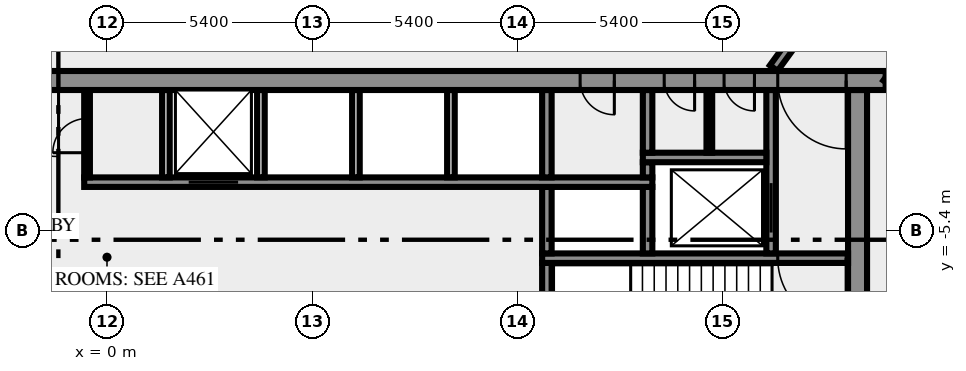
"""IFC4 building model, lengths in metres.
Left out: names, types, materials, properties, quantities, classifications, styles, units other than length and angle.
Written with IfcOpenShell. Run it as: python <this file> out.ifc"""

import sys

from ifc_helpers import new_model, si_unit, direction, frame, frame_2d, origin, place, context, subcontext, project, spatial, rectangle, extrude, element, fill, save


model = new_model("IFC4")
c1 = context("Model", 3, precision=1e-05, world=origin(), true_north=direction((0.0, 1.0)))
c2 = subcontext(c1, "Body", "Model", "MODEL_VIEW")
j1 = project(units=[si_unit("LENGTHUNIT", "METRE"), si_unit("PLANEANGLEUNIT", "RADIAN")], contexts=[c1])
p1 = place(None, origin())
s1 = spatial("IfcSite", under=j1, at=p1, CompositionType="ELEMENT")
p2 = place(p1, origin())
s2 = spatial("IfcBuilding", under=s1, at=p2, CompositionType="ELEMENT")
p3 = place(p2, frame((0.0, 0.0, 71.0)))
s3 = spatial("IfcBuildingStorey", under=s2, at=p3, CompositionType="ELEMENT", Elevation=71.0)
p4 = place(p3, frame((19.75, -10.5, 0.0), z_axis=(0.0, 0.0, 1.0), x_axis=(0.0, 1.0, 0.0)))
e1 = element("IfcWall", 1, at=p4, inside=s3, PredefinedType="SHEAR", context=c2, shape_type="SweptSolid", body=[
    extrude(rectangle(XDim=8.8, YDim=0.5, at=frame_2d((4.4, 0.0))), origin(), (0.0, 0.0, 1.0), 3.65),
])
p5 = place(p3, frame((11.575, -7.25, 0.0), z_axis=(0.0, 0.0, 1.0), x_axis=(0.0, 1.0, 0.0)))
e2 = element("IfcWall", 2, at=p5, inside=s3, PredefinedType="SHEAR", context=c2, shape_type="SweptSolid", body=[
    extrude(rectangle(XDim=1.0, YDim=0.25, at=frame_2d((0.5, 0.0))), origin(), (0.0, 0.0, 1.0), 3.65),
])
p6 = place(p3, frame((19.5, -6.125, 0.0), z_axis=(0.0, 0.0, 1.0), x_axis=(-1.0, 0.0, 0.0)))
e3 = element("IfcWall", 3, at=p6, inside=s3, PredefinedType="SHEAR", context=c2, shape_type="SweptSolid", body=[
    extrude(rectangle(XDim=8.05, YDim=0.25, at=frame_2d((4.025, 0.0))), origin(), (0.0, 0.0, 1.0), 3.65),
])
p7 = place(p6, frame((0.05, 0.0, 0.0)))
e4 = element("IfcOpeningElement", 4, at=p7, cuts=e3, PredefinedType="OPENING", context=c2, shape_type="SweptSolid", body=[
    extrude(rectangle(XDim=1.8, YDim=2.1, at=frame_2d((0.9, 1.05))), frame((0.0, 0.135, 0.0), z_axis=(0.0, -1.0, 0.0), x_axis=(1.0, 0.0, 0.0)), (0.0, 0.0, 1.0), 0.27),
])
for number, where, z_axis, x_axis in (
    (5, (11.575, -6.0, 0.0), (0.0, 0.0, 1.0), (0.0, 1.0, 0.0)),
    (6, (14.225, -6.0, 0.0), (0.0, 0.0, 1.0), (0.0, 1.0, 0.0)),
):
    element("IfcWall", number, at=place(p3, frame(where, z_axis=z_axis, x_axis=x_axis)), inside=s3, PredefinedType="SHEAR", context=c2, shape_type="SweptSolid", body=[
        extrude(rectangle(XDim=1.75, YDim=0.25, at=frame_2d((0.875, 0.0))), origin(), (0.0, 0.0, 1.0), 3.65),
    ])
p8 = place(p3, frame((17.475, -6.0, 0.0), z_axis=(0.0, 0.0, 1.0), x_axis=(0.0, 1.0, 0.0)))
e7 = element("IfcWall", 7, at=p8, inside=s3, PredefinedType="SHEAR", context=c2, shape_type="SweptSolid", body=[
    extrude(rectangle(XDim=4.3, YDim=0.25, at=frame_2d((2.15, 0.0))), origin(), (0.0, 0.0, 1.0), 3.65),
])
p9 = place(p8, frame((0.55, 0.0, 0.0)))
e8 = element("IfcOpeningElement", 8, at=p9, cuts=e7, PredefinedType="OPENING", context=c2, shape_type="SweptSolid", body=[
    extrude(rectangle(XDim=1.3, YDim=2.1, at=frame_2d((0.65, 1.05))), frame((0.0, 0.135, 0.0), z_axis=(0.0, -1.0, 0.0), x_axis=(1.0, 0.0, 0.0)), (0.0, 0.0, 1.0), 0.27),
])
p10 = place(p3, frame((-0.6, -4.125, 0.0), z_axis=(0.0, 0.0, 1.0), x_axis=(1.0, 0.0, 0.0)))
e9 = element("IfcWall", 9, at=p10, inside=s3, PredefinedType="SHEAR", context=c2, shape_type="SweptSolid", body=[
    extrude(rectangle(XDim=14.95, YDim=0.25, at=frame_2d((7.475, 0.0))), origin(), (0.0, 0.0, 1.0), 3.65),
])
p11 = place(p10, frame((2.75, 0.0, 0.0)))
e10 = element("IfcOpeningElement", 10, at=p11, cuts=e9, PredefinedType="OPENING", context=c2, shape_type="SweptSolid", body=[
    extrude(rectangle(XDim=1.3, YDim=2.1, at=frame_2d((0.65, 1.05))), frame((0.0, 0.135, 0.0), z_axis=(0.0, -1.0, 0.0), x_axis=(1.0, 0.0, 0.0)), (0.0, 0.0, 1.0), 0.27),
])
p12 = place(p3, frame((-0.525, -4.0, 0.0), z_axis=(0.0, 0.0, 1.0), x_axis=(0.0, 1.0, 0.0)))
e11 = element("IfcWall", 11, at=p12, inside=s3, PredefinedType="PARTITIONING", context=c2, shape_type="SweptSolid", body=[
    extrude(rectangle(XDim=2.3, YDim=0.15, at=frame_2d((1.15, 0.0))), origin(), (0.0, 0.0, 1.0), 3.65),
])
p13 = place(p12, frame((0.65, 0.0, 0.0)))
e12 = element("IfcOpeningElement", 12, at=p13, cuts=e11, PredefinedType="OPENING", context=c2, shape_type="SweptSolid", body=[
    extrude(rectangle(XDim=0.9, YDim=2.1, at=frame_2d((0.45, 1.05))), frame((0.0, 0.085, 0.0), z_axis=(0.0, -1.0, 0.0), x_axis=(1.0, 0.0, 0.0)), (0.0, 0.0, 1.0), 0.17),
])
for number, where, z_axis, x_axis in (
    (13, (1.55, -4.0, 0.0), (0.0, 0.0, 1.0), (0.0, 1.0, 0.0)),
    (14, (4.05, -4.0, 0.0), (0.0, 0.0, 1.0), (0.0, 1.0, 0.0)),
    (15, (6.55, -4.0, 0.0), (0.0, 0.0, 1.0), (0.0, 1.0, 0.0)),
    (16, (9.05, -4.0, 0.0), (0.0, 0.0, 1.0), (0.0, 1.0, 0.0)),
):
    element("IfcWall", number, at=place(p3, frame(where, z_axis=z_axis, x_axis=x_axis)), inside=s3, PredefinedType="SOLIDWALL", context=c2, shape_type="SweptSolid", body=[
        extrude(rectangle(XDim=2.3, YDim=0.2, at=frame_2d((1.15, 0.0))), origin(), (0.0, 0.0, 1.0), 3.65),
    ])
p14 = place(p3, frame((11.575, -4.0, 0.0), z_axis=(0.0, 0.0, 1.0), x_axis=(0.0, 1.0, 0.0)))
e17 = element("IfcWall", 17, at=p14, inside=s3, PredefinedType="SHEAR", context=c2, shape_type="SweptSolid", body=[
    extrude(rectangle(XDim=2.3, YDim=0.25, at=frame_2d((1.15, 0.0))), origin(), (0.0, 0.0, 1.0), 3.65),
])
p15 = place(p3, frame((14.225, -4.0, 0.0), z_axis=(0.0, 0.0, 1.0), x_axis=(0.0, 1.0, 0.0)))
e18 = element("IfcWall", 18, at=p15, inside=s3, PredefinedType="SHEAR", context=c2, shape_type="SweptSolid", body=[
    extrude(rectangle(XDim=0.4, YDim=0.25, at=frame_2d((0.2, 0.0))), origin(), (0.0, 0.0, 1.0), 3.65),
])
p16 = place(p3, frame((14.1, -3.475, 0.0), z_axis=(0.0, 0.0, 1.0), x_axis=(1.0, 0.0, 0.0)))
e19 = element("IfcWall", 19, at=p16, inside=s3, PredefinedType="SHEAR", context=c2, shape_type="SweptSolid", body=[
    extrude(rectangle(XDim=3.25, YDim=0.25, at=frame_2d((1.625, 0.0))), origin(), (0.0, 0.0, 1.0), 3.65),
])
p17 = place(p3, frame((14.225, -3.35, 0.0), z_axis=(0.0, 0.0, 1.0), x_axis=(0.0, 1.0, 0.0)))
e20 = element("IfcWall", 20, at=p17, inside=s3, PredefinedType="SHEAR", context=c2, shape_type="SweptSolid", body=[
    extrude(rectangle(XDim=1.65, YDim=0.25, at=frame_2d((0.825, 0.0))), origin(), (0.0, 0.0, 1.0), 3.65),
])
p18 = place(p3, frame((15.85, -3.35, 0.0), z_axis=(0.0, 0.0, 1.0), x_axis=(0.0, 1.0, 0.0)))
e21 = element("IfcWall", 21, at=p18, inside=s3, PredefinedType="PARTITIONING", context=c2, shape_type="SweptSolid", body=[
    extrude(rectangle(XDim=1.65, YDim=0.15, at=frame_2d((0.825, 0.0))), origin(), (0.0, 0.0, 1.0), 3.65),
])
p19 = place(p3, frame((20.49, -1.45, 0.0), z_axis=(0.0, 0.0, 1.0), x_axis=(-1.0, 0.0, 0.0)))
e22 = element("IfcWall", 22, at=p19, inside=s3, PredefinedType="SHEAR", context=c2, shape_type="SweptSolid", body=[
    extrude(rectangle(XDim=40.98, YDim=0.5, at=frame_2d((20.49, 0.0))), origin(), (0.0, 0.0, 1.0), 3.65),
])
p20 = place(p19, frame((38.14, 0.0, 0.0)))
e23 = element("IfcOpeningElement", 23, at=p20, cuts=e22, PredefinedType="OPENING", context=c2, shape_type="SweptSolid", body=[
    extrude(rectangle(XDim=1.8, YDim=2.1, at=frame_2d((0.9, 1.05))), frame((0.0, 0.26, 0.0), z_axis=(0.0, -1.0, 0.0), x_axis=(1.0, 0.0, 0.0)), (0.0, 0.0, 1.0), 0.52),
])
p21 = place(p19, frame((35.89, 0.0, 0.0)))
e24 = element("IfcOpeningElement", 24, at=p21, cuts=e22, PredefinedType="OPENING", context=c2, shape_type="SweptSolid", body=[
    extrude(rectangle(XDim=0.9, YDim=2.1, at=frame_2d((0.45, 1.05))), frame((0.0, 0.26, 0.0), z_axis=(0.0, -1.0, 0.0), x_axis=(1.0, 0.0, 0.0)), (0.0, 0.0, 1.0), 0.52),
])
p22 = place(p19, frame((32.94, 0.0, 0.0)))
e25 = element("IfcOpeningElement", 25, at=p22, cuts=e22, PredefinedType="OPENING", context=c2, shape_type="SweptSolid", body=[
    extrude(rectangle(XDim=0.9, YDim=2.1, at=frame_2d((0.45, 1.05))), frame((0.0, 0.26, 0.0), z_axis=(0.0, -1.0, 0.0), x_axis=(1.0, 0.0, 0.0)), (0.0, 0.0, 1.0), 0.52),
])
p23 = place(p19, frame((21.765, 0.0, 0.0)))
e26 = element("IfcOpeningElement", 26, at=p23, cuts=e22, PredefinedType="OPENING", context=c2, shape_type="SweptSolid", body=[
    extrude(rectangle(XDim=2.0, YDim=2.1, at=frame_2d((1.0, 1.05))), frame((0.0, 0.26, 0.0), z_axis=(0.0, -1.0, 0.0), x_axis=(1.0, 0.0, 0.0)), (0.0, 0.0, 1.0), 0.52),
])
p24 = place(p19, frame((7.14, 0.0, 0.0)))
e27 = element("IfcOpeningElement", 27, at=p24, cuts=e22, PredefinedType="OPENING", context=c2, shape_type="SweptSolid", body=[
    extrude(rectangle(XDim=0.9, YDim=2.1, at=frame_2d((0.45, 1.05))), frame((0.0, 0.26, 0.0), z_axis=(0.0, -1.0, 0.0), x_axis=(1.0, 0.0, 0.0)), (0.0, 0.0, 1.0), 0.52),
])
p25 = place(p19, frame((5.028, 0.0, 0.0)))
e28 = element("IfcOpeningElement", 28, at=p25, cuts=e22, PredefinedType="OPENING", context=c2, shape_type="SweptSolid", body=[
    extrude(rectangle(XDim=0.8, YDim=2.1, at=frame_2d((0.4, 1.05))), frame((0.0, 0.26, 0.0), z_axis=(0.0, -1.0, 0.0), x_axis=(1.0, 0.0, 0.0)), (0.0, 0.0, 1.0), 0.52),
])
p26 = place(p19, frame((3.452, 0.0, 0.0)))
e29 = element("IfcOpeningElement", 29, at=p26, cuts=e22, PredefinedType="OPENING", context=c2, shape_type="SweptSolid", body=[
    extrude(rectangle(XDim=0.8, YDim=2.1, at=frame_2d((0.4, 1.05))), frame((0.0, 0.26, 0.0), z_axis=(0.0, -1.0, 0.0), x_axis=(1.0, 0.0, 0.0)), (0.0, 0.0, 1.0), 0.52),
])
p27 = place(p19, frame((1.04, 0.0, 0.0)))
e30 = element("IfcOpeningElement", 30, at=p27, cuts=e22, PredefinedType="OPENING", context=c2, shape_type="SweptSolid", body=[
    extrude(rectangle(XDim=1.8, YDim=2.1, at=frame_2d((0.9, 1.05))), frame((0.0, 0.26, 0.0), z_axis=(0.0, -1.0, 0.0), x_axis=(1.0, 0.0, 0.0)), (0.0, 0.0, 1.0), 0.52),
])
p28 = place(p3, frame((17.545, -1.125, 0.0), z_axis=(0.0, 0.0, 1.0), x_axis=(0.587786323093, 0.809016216391, 0.0)))
e31 = element("IfcWall", 31, at=p28, inside=s3, PredefinedType="SOLIDWALL", context=c2, shape_type="SweptSolid", body=[
    extrude(rectangle(XDim=33.493, YDim=0.25, at=frame_2d((16.747, 0.0))), origin(), (0.0, 0.0, 1.0), 3.65),
])
p29 = place(p28, frame((27.458, 0.0, 0.0)))
e32 = element("IfcOpeningElement", 32, at=p29, cuts=e31, PredefinedType="OPENING", context=c2, shape_type="SweptSolid", body=[
    extrude(rectangle(XDim=1.8, YDim=2.1, at=frame_2d((0.9, 1.05))), frame((0.0, 0.135, 0.0), z_axis=(0.0, -1.0, 0.0), x_axis=(1.0, 0.0, 0.0)), (0.0, 0.0, 1.0), 0.27),
])
p30 = place(p28, frame((3.392, 0.0, 0.0)))
e33 = element("IfcOpeningElement", 33, at=p30, cuts=e31, PredefinedType="OPENING", context=c2, shape_type="SweptSolid", body=[
    extrude(rectangle(XDim=1.8, YDim=2.1, at=frame_2d((0.9, 1.05))), frame((0.0, 0.135, 0.0), z_axis=(0.0, -1.0, 0.0), x_axis=(1.0, 0.0, 0.0)), (0.0, 0.0, 1.0), 0.27),
])
p31 = place(p28, frame((32.253, 0.0, 0.0)))
e34 = element("IfcOpeningElement", 34, at=p31, cuts=e31, PredefinedType="OPENING", context=c2, shape_type="SweptSolid", body=[
    extrude(rectangle(XDim=0.9, YDim=2.1, at=frame_2d((0.45, 1.05))), frame((0.0, 0.135, 0.0), z_axis=(0.0, -1.0, 0.0), x_axis=(1.0, 0.0, 0.0)), (0.0, 0.0, 1.0), 0.27),
])
p32 = place(p3, frame((43.467, 30.045, 0.0), z_axis=(0.0, 0.0, 1.0), x_axis=(-0.587784726077, -0.809017376692, 0.0)))
e35 = element("IfcWall", 35, at=p32, inside=s3, PredefinedType="SOLIDWALL", context=c2, shape_type="SweptSolid", body=[
    extrude(rectangle(XDim=39.02, YDim=0.25, at=frame_2d((19.51, 0.0))), origin(), (0.0, 0.0, 1.0), 3.65),
])
p33 = place(p32, frame((26.254, 0.0, 0.0)))
e36 = element("IfcOpeningElement", 36, at=p33, cuts=e35, PredefinedType="OPENING", context=c2, shape_type="SweptSolid", body=[
    extrude(rectangle(XDim=0.9, YDim=2.1, at=frame_2d((0.45, 1.05))), frame((0.0, 0.135, 0.0), z_axis=(0.0, -1.0, 0.0), x_axis=(1.0, 0.0, 0.0)), (0.0, 0.0, 1.0), 0.27),
])
p34 = place(p32, frame((2.205, 0.0, 0.0)))
e37 = element("IfcOpeningElement", 37, at=p34, cuts=e35, PredefinedType="OPENING", context=c2, shape_type="SweptSolid", body=[
    extrude(rectangle(XDim=0.9, YDim=2.1, at=frame_2d((0.45, 1.05))), frame((0.0, 0.135, 0.0), z_axis=(0.0, -1.0, 0.0), x_axis=(1.0, 0.0, 0.0)), (0.0, 0.0, 1.0), 0.27),
])
p35 = place(p32, frame((27.855, 0.0, 0.0)))
e38 = element("IfcOpeningElement", 38, at=p35, cuts=e35, PredefinedType="OPENING", context=c2, shape_type="SweptSolid", body=[
    extrude(rectangle(XDim=0.9, YDim=2.1, at=frame_2d((0.45, 1.05))), frame((0.0, 0.135, 0.0), z_axis=(0.0, -1.0, 0.0), x_axis=(1.0, 0.0, 0.0)), (0.0, 0.0, 1.0), 0.27),
])
p36 = place(p32, frame((18.155, 0.0, 0.0)))
e39 = element("IfcOpeningElement", 39, at=p36, cuts=e35, PredefinedType="OPENING", context=c2, shape_type="SweptSolid", body=[
    extrude(rectangle(XDim=0.9, YDim=2.1, at=frame_2d((0.45, 1.05))), frame((0.0, 0.135, 0.0), z_axis=(0.0, -1.0, 0.0), x_axis=(1.0, 0.0, 0.0)), (0.0, 0.0, 1.0), 0.27),
])
p37 = place(p32, frame((19.755, 0.0, 0.0)))
e40 = element("IfcOpeningElement", 40, at=p37, cuts=e35, PredefinedType="OPENING", context=c2, shape_type="SweptSolid", body=[
    extrude(rectangle(XDim=0.9, YDim=2.1, at=frame_2d((0.45, 1.05))), frame((0.0, 0.135, 0.0), z_axis=(0.0, -1.0, 0.0), x_axis=(1.0, 0.0, 0.0)), (0.0, 0.0, 1.0), 0.27),
])
p38 = place(p32, frame((0.224, 0.0, 0.0)))
e41 = element("IfcOpeningElement", 41, at=p38, cuts=e35, PredefinedType="OPENING", context=c2, shape_type="SweptSolid", body=[
    extrude(rectangle(XDim=0.9, YDim=2.1, at=frame_2d((0.45, 1.05))), frame((0.0, 0.135, 0.0), z_axis=(0.0, -1.0, 0.0), x_axis=(1.0, 0.0, 0.0)), (0.0, 0.0, 1.0), 0.27),
])
p39 = place(p7, origin())
e42 = element("IfcDoor", 42, at=p39, inside=s3, OperationType="DOUBLE_DOOR_SINGLE_SWING", PredefinedType="DOOR", context=c2, shape_type="SweptSolid", body=[
    extrude(rectangle(XDim=1.8, YDim=2.1, at=frame_2d((0.9, 1.05))), frame((0.0, 0.025, 0.0), z_axis=(0.0, -1.0, 0.0), x_axis=(1.0, 0.0, 0.0)), (0.0, 0.0, 1.0), 0.05),
])
fill(e4, e42)
p40 = place(p9, origin())
e43 = element("IfcDoor", 43, at=p40, inside=s3, OperationType="DOUBLE_DOOR_SLIDING", PredefinedType="DOOR", context=c2, shape_type="SweptSolid", body=[
    extrude(rectangle(XDim=1.3, YDim=2.1, at=frame_2d((0.65, 1.05))), frame((0.0, 0.025, 0.0), z_axis=(0.0, -1.0, 0.0), x_axis=(1.0, 0.0, 0.0)), (0.0, 0.0, 1.0), 0.05),
])
fill(e8, e43)
p41 = place(p11, origin())
e44 = element("IfcDoor", 44, at=p41, inside=s3, OperationType="DOUBLE_DOOR_SLIDING", PredefinedType="DOOR", context=c2, shape_type="SweptSolid", body=[
    extrude(rectangle(XDim=1.3, YDim=2.1, at=frame_2d((0.65, 1.05))), frame((0.0, 0.025, 0.0), z_axis=(0.0, -1.0, 0.0), x_axis=(1.0, 0.0, 0.0)), (0.0, 0.0, 1.0), 0.05),
])
fill(e10, e44)
p42 = place(p13, origin())
e45 = element("IfcDoor", 45, at=p42, inside=s3, OperationType="SINGLE_SWING_LEFT", PredefinedType="DOOR", context=c2, shape_type="SweptSolid", body=[
    extrude(rectangle(XDim=0.9, YDim=2.1, at=frame_2d((0.45, 1.05))), frame((0.0, 0.025, 0.0), z_axis=(0.0, -1.0, 0.0), x_axis=(1.0, 0.0, 0.0)), (0.0, 0.0, 1.0), 0.05),
])
fill(e12, e45)
p43 = place(p23, origin())
e46 = element("IfcDoor", 46, at=p43, inside=s3, OperationType="DOUBLE_DOOR_SINGLE_SWING", PredefinedType="DOOR", context=c2, shape_type="SweptSolid", body=[
    extrude(rectangle(XDim=2.0, YDim=2.1, at=frame_2d((1.0, 1.05))), frame((0.0, 0.025, 0.0), z_axis=(0.0, -1.0, 0.0), x_axis=(1.0, 0.0, 0.0)), (0.0, 0.0, 1.0), 0.05),
])
fill(e26, e46)
p44 = place(p24, origin())
e47 = element("IfcDoor", 47, at=p44, inside=s3, OperationType="SINGLE_SWING_LEFT", PredefinedType="DOOR", context=c2, shape_type="SweptSolid", body=[
    extrude(rectangle(XDim=0.9, YDim=2.1, at=frame_2d((0.45, 1.05))), frame((0.0, 0.025, 0.0), z_axis=(0.0, -1.0, 0.0), x_axis=(1.0, 0.0, 0.0)), (0.0, 0.0, 1.0), 0.05),
])
fill(e27, e47)
p45 = place(p25, origin())
e48 = element("IfcDoor", 48, at=p45, inside=s3, OperationType="SINGLE_SWING_LEFT", PredefinedType="DOOR", context=c2, shape_type="SweptSolid", body=[
    extrude(rectangle(XDim=0.8, YDim=2.1, at=frame_2d((0.4, 1.05))), frame((0.0, 0.025, 0.0), z_axis=(0.0, -1.0, 0.0), x_axis=(1.0, 0.0, 0.0)), (0.0, 0.0, 1.0), 0.05),
])
fill(e28, e48)
p46 = place(p26, origin())
e49 = element("IfcDoor", 49, at=p46, inside=s3, OperationType="SINGLE_SWING_LEFT", PredefinedType="DOOR", context=c2, shape_type="SweptSolid", body=[
    extrude(rectangle(XDim=0.8, YDim=2.1, at=frame_2d((0.4, 1.05))), frame((0.0, 0.025, 0.0), z_axis=(0.0, -1.0, 0.0), x_axis=(1.0, 0.0, 0.0)), (0.0, 0.0, 1.0), 0.05),
])
fill(e29, e49)
p47 = place(p27, origin())
e50 = element("IfcDoor", 50, at=p47, inside=s3, OperationType="DOUBLE_DOOR_SINGLE_SWING", PredefinedType="DOOR", context=c2, shape_type="SweptSolid", body=[
    extrude(rectangle(XDim=1.8, YDim=2.1, at=frame_2d((0.9, 1.05))), frame((0.0, 0.025, 0.0), z_axis=(0.0, -1.0, 0.0), x_axis=(1.0, 0.0, 0.0)), (0.0, 0.0, 1.0), 0.05),
])
fill(e30, e50)
save(model, sys.argv[1])
